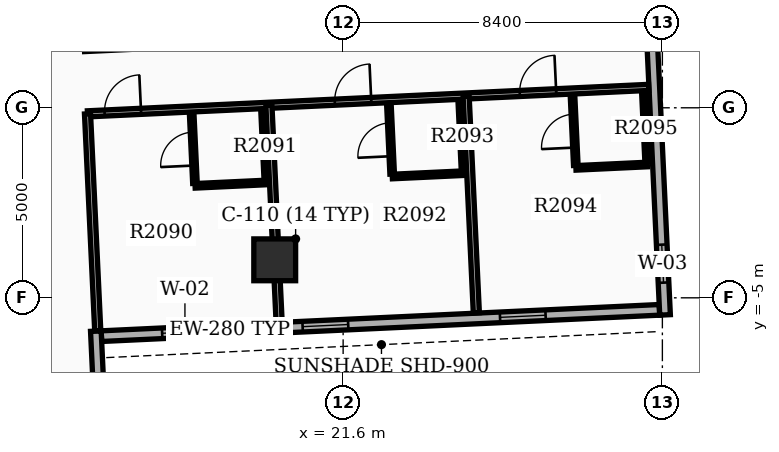
"""IFC4 building model, lengths in metres.
Left out: names, types, materials, properties, quantities, classifications, styles, units other than length and angle.
Written with IfcOpenShell. Run it as: python <this file> out.ifc"""

import sys

from ifc_helpers import new_model, si_unit, direction, frame, frame_2d, origin, origin_2d, place, context, subcontext, project, spatial, rectangle, extrude, element, fill, save


model = new_model("IFC4")
c1 = context("Model", 3, precision=1e-05, world=origin(), true_north=direction((0.0, 1.0)))
c2 = subcontext(c1, "Body", "Model", "MODEL_VIEW")
j1 = project(units=[si_unit("LENGTHUNIT", "METRE"), si_unit("PLANEANGLEUNIT", "RADIAN")], contexts=[c1])
p1 = place(None, origin())
s1 = spatial("IfcSite", under=j1, at=p1, CompositionType="ELEMENT")
p2 = place(p1, origin())
s2 = spatial("IfcBuilding", under=s1, at=p2, CompositionType="ELEMENT")
p3 = place(p2, frame((0.0, 0.0, 132.0)))
s3 = spatial("IfcBuildingStorey", under=s2, at=p3, CompositionType="ELEMENT", Elevation=132.0)
p4 = place(p3, frame((19.8, -4.0, 0.0), z_axis=(0.0, 0.0, 1.0), x_axis=(1.0, 0.0, 0.0)))
e1 = element("IfcColumn", 1, at=p4, inside=s3, PredefinedType="COLUMN", context=c2, shape_type="SweptSolid", body=[
    extrude(rectangle(XDim=1.1, YDim=1.1, at=origin_2d()), origin(), (0.0, 0.0, 1.0), 3.9),
])
p5 = place(p3, frame((15.24, -6.009, 0.0), z_axis=(0.0, 0.0, 1.0), x_axis=(0.998890124275, 0.047101163748, 0.0)))
e2 = element("IfcWall", 2, at=p5, inside=s3, PredefinedType="STANDARD", context=c2, shape_type="SweptSolid", body=[
    extrude(rectangle(XDim=14.7, YDim=0.28, at=frame_2d((7.35, 0.0))), origin(), (0.0, 0.0, 1.0), 2.97),
])
p6 = place(p5, frame((1.6, 0.0, 0.8)))
e3 = element("IfcOpeningElement", 3, at=p6, cuts=e2, PredefinedType="OPENING", context=c2, shape_type="SweptSolid", body=[
    extrude(rectangle(XDim=1.2, YDim=1.6, at=frame_2d((0.6, 0.8))), frame((0.0, 0.15, 0.0), z_axis=(0.0, -1.0, 0.0), x_axis=(1.0, 0.0, 0.0)), (0.0, 0.0, 1.0), 0.3),
])
p7 = place(p5, frame((5.3, 0.0, 0.8)))
e4 = element("IfcOpeningElement", 4, at=p7, cuts=e2, PredefinedType="OPENING", context=c2, shape_type="SweptSolid", body=[
    extrude(rectangle(XDim=1.2, YDim=1.6, at=frame_2d((0.6, 0.8))), frame((0.0, 0.15, 0.0), z_axis=(0.0, -1.0, 0.0), x_axis=(1.0, 0.0, 0.0)), (0.0, 0.0, 1.0), 0.3),
])
p8 = place(p5, frame((10.5, 0.0, 0.8)))
e5 = element("IfcOpeningElement", 5, at=p8, cuts=e2, PredefinedType="OPENING", context=c2, shape_type="SweptSolid", body=[
    extrude(rectangle(XDim=1.2, YDim=1.6, at=frame_2d((0.6, 0.8))), frame((0.0, 0.15, 0.0), z_axis=(0.0, -1.0, 0.0), x_axis=(1.0, 0.0, 0.0)), (0.0, 0.0, 1.0), 0.3),
])
p9 = place(p3, frame((30.07, -5.45, 0.0), z_axis=(0.0, 0.0, 1.0), x_axis=(-0.047101845086, 0.998890092147, 0.0)))
e6 = element("IfcWall", 6, at=p9, inside=s3, PredefinedType="STANDARD", context=c2, shape_type="SweptSolid", body=[
    extrude(rectangle(XDim=13.72, YDim=0.28, at=frame_2d((6.86, 0.0))), origin(), (0.0, 0.0, 1.0), 2.97),
])
p10 = place(p9, frame((0.85, 0.0, 0.85)))
e7 = element("IfcOpeningElement", 7, at=p10, cuts=e6, PredefinedType="OPENING", context=c2, shape_type="SweptSolid", body=[
    extrude(rectangle(XDim=1.0, YDim=1.5, at=frame_2d((0.5, 0.75))), frame((0.0, 0.15, 0.0), z_axis=(0.0, -1.0, 0.0), x_axis=(1.0, 0.0, 0.0)), (0.0, 0.0, 1.0), 0.3),
])
p11 = place(p3, frame((15.094, -5.875, 0.0), z_axis=(0.0, 0.0, 1.0), x_axis=(0.04712043756, -0.998889215261, 0.0)))
e8 = element("IfcWall", 8, at=p11, inside=s3, PredefinedType="STANDARD", context=c2, shape_type="SweptSolid", body=[
    extrude(rectangle(XDim=6.86, YDim=0.28, at=frame_2d((3.43, 0.0))), origin(), (0.0, 0.0, 1.0), 2.97),
])
p12 = place(p3, frame((14.874, -0.159, 0.0), z_axis=(0.0, 0.0, 1.0), x_axis=(0.99889000272, 0.04710374153, 0.0)))
e9 = element("IfcWall", 9, at=p12, inside=s3, PredefinedType="PARTITIONING", context=c2, shape_type="SweptSolid", body=[
    extrude(rectangle(XDim=14.782, YDim=0.16, at=frame_2d((7.391, 0.0))), origin(), (0.0, 0.0, 1.0), 2.96),
])
p13 = place(p12, frame((0.45, 0.0, 0.0)))
e10 = element("IfcOpeningElement", 10, at=p13, cuts=e9, PredefinedType="OPENING", context=c2, shape_type="SweptSolid", body=[
    extrude(rectangle(XDim=0.96, YDim=2.15, at=frame_2d((0.48, 1.075))), frame((0.0, 0.09, 0.0), z_axis=(0.0, -1.0, 0.0), x_axis=(1.0, 0.0, 0.0)), (0.0, 0.0, 1.0), 0.18),
])
p14 = place(p12, frame((6.514, 0.0, 0.0)))
e11 = element("IfcOpeningElement", 11, at=p14, cuts=e9, PredefinedType="OPENING", context=c2, shape_type="SweptSolid", body=[
    extrude(rectangle(XDim=0.96, YDim=2.15, at=frame_2d((0.48, 1.075))), frame((0.0, 0.09, 0.0), z_axis=(0.0, -1.0, 0.0), x_axis=(1.0, 0.0, 0.0)), (0.0, 0.0, 1.0), 0.18),
])
p15 = place(p12, frame((11.386, 0.0, 0.0)))
e12 = element("IfcOpeningElement", 12, at=p15, cuts=e9, PredefinedType="OPENING", context=c2, shape_type="SweptSolid", body=[
    extrude(rectangle(XDim=0.96, YDim=2.15, at=frame_2d((0.48, 1.075))), frame((0.0, 0.09, 0.0), z_axis=(0.0, -1.0, 0.0), x_axis=(1.0, 0.0, 0.0)), (0.0, 0.0, 1.0), 0.18),
])
for number, where, z_axis, x_axis in (
    (13, (14.874, -0.159, 0.0), (0.0, 0.0, 1.0), (0.047, -0.999, 0.0)),
    (14, (19.647, 0.066, 0.0), (0.0, 0.0, 1.0), (0.047, -0.999, 0.0)),
):
    element("IfcWall", number, at=place(p3, frame(where, z_axis=z_axis, x_axis=x_axis)), inside=s3, PredefinedType="PARTITIONING", context=c2, shape_type="SweptSolid", body=[
        extrude(rectangle(XDim=5.712, YDim=0.16, at=frame_2d((2.856, 0.0))), origin(), (0.0, 0.0, 1.0), 2.96),
    ])
p16 = place(p3, frame((17.701, -1.988, 0.0), z_axis=(0.0, 0.0, 1.0), x_axis=(-0.047220968666, 0.998884467853, 0.0)))
e15 = element("IfcWall", 15, at=p16, inside=s3, PredefinedType="PARTITIONING", context=c2, shape_type="SweptSolid", body=[
    extrude(rectangle(XDim=1.82, YDim=0.12, at=frame_2d((0.91, 0.0))), origin(), (0.0, 0.0, 1.0), 2.96),
])
p17 = place(p16, frame((0.47, 0.0, 0.0)))
e16 = element("IfcOpeningElement", 16, at=p17, cuts=e15, PredefinedType="OPENING", context=c2, shape_type="SweptSolid", body=[
    extrude(rectangle(XDim=0.88, YDim=2.1, at=frame_2d((0.44, 1.05))), frame((0.0, 0.07, 0.0), z_axis=(0.0, -1.0, 0.0), x_axis=(1.0, 0.0, 0.0)), (0.0, 0.0, 1.0), 0.14),
])
p18 = place(p3, frame((19.579, -1.9, 0.0), z_axis=(0.0, 0.0, 1.0), x_axis=(-0.047080807099, 0.998891083954, 0.0)))
e17 = element("IfcWall", 17, at=p18, inside=s3, PredefinedType="PARTITIONING", context=c2, shape_type="SweptSolid", body=[
    extrude(rectangle(XDim=1.82, YDim=0.12, at=frame_2d((0.91, 0.0))), origin(), (0.0, 0.0, 1.0), 2.96),
])
p19 = place(p3, frame((17.704, -2.053, 0.0), z_axis=(0.0, 0.0, 1.0), x_axis=(0.998888319371, 0.047139425368, 0.0)))
e18 = element("IfcWall", 18, at=p19, inside=s3, PredefinedType="PARTITIONING", context=c2, shape_type="SweptSolid", body=[
    extrude(rectangle(XDim=1.88, YDim=0.12, at=frame_2d((0.94, 0.0))), origin(), (0.0, 0.0, 1.0), 2.96),
])
p20 = place(p3, frame((24.836, 0.31, 0.0), z_axis=(0.0, 0.0, 1.0), x_axis=(0.047100122846, -0.998890173356, 0.0)))
e19 = element("IfcWall", 19, at=p20, inside=s3, PredefinedType="PARTITIONING", context=c2, shape_type="SweptSolid", body=[
    extrude(rectangle(XDim=5.712, YDim=0.16, at=frame_2d((2.856, 0.0))), origin(), (0.0, 0.0, 1.0), 2.96),
])
p21 = place(p3, frame((22.89, -1.744, 0.0), z_axis=(0.0, 0.0, 1.0), x_axis=(-0.047087116047, 0.998890786574, 0.0)))
e20 = element("IfcWall", 20, at=p21, inside=s3, PredefinedType="PARTITIONING", context=c2, shape_type="SweptSolid", body=[
    extrude(rectangle(XDim=1.82, YDim=0.12, at=frame_2d((0.91, 0.0))), origin(), (0.0, 0.0, 1.0), 2.96),
])
p22 = place(p21, frame((0.47, 0.0, 0.0)))
e21 = element("IfcOpeningElement", 21, at=p22, cuts=e20, PredefinedType="OPENING", context=c2, shape_type="SweptSolid", body=[
    extrude(rectangle(XDim=0.88, YDim=2.1, at=frame_2d((0.44, 1.05))), frame((0.0, 0.07, 0.0), z_axis=(0.0, -1.0, 0.0), x_axis=(1.0, 0.0, 0.0)), (0.0, 0.0, 1.0), 0.14),
])
p23 = place(p3, frame((24.769, -1.655, 0.0), z_axis=(0.0, 0.0, 1.0), x_axis=(-0.047220968666, 0.998884467853, 0.0)))
e22 = element("IfcWall", 22, at=p23, inside=s3, PredefinedType="PARTITIONING", context=c2, shape_type="SweptSolid", body=[
    extrude(rectangle(XDim=1.82, YDim=0.12, at=frame_2d((0.91, 0.0))), origin(), (0.0, 0.0, 1.0), 2.96),
])
p24 = place(p3, frame((22.894, -1.809, 0.0), z_axis=(0.0, 0.0, 1.0), x_axis=(0.998888319371, 0.047139425368, 0.0)))
e23 = element("IfcWall", 23, at=p24, inside=s3, PredefinedType="PARTITIONING", context=c2, shape_type="SweptSolid", body=[
    extrude(rectangle(XDim=1.88, YDim=0.12, at=frame_2d((0.94, 0.0))), origin(), (0.0, 0.0, 1.0), 2.96),
])
p25 = place(p3, frame((27.722, -1.516, 0.0), z_axis=(0.0, 0.0, 1.0), x_axis=(-0.047080807099, 0.998891083954, 0.0)))
e24 = element("IfcWall", 24, at=p25, inside=s3, PredefinedType="PARTITIONING", context=c2, shape_type="SweptSolid", body=[
    extrude(rectangle(XDim=1.82, YDim=0.12, at=frame_2d((0.91, 0.0))), origin(), (0.0, 0.0, 1.0), 2.96),
])
p26 = place(p25, frame((0.47, 0.0, 0.0)))
e25 = element("IfcOpeningElement", 25, at=p26, cuts=e24, PredefinedType="OPENING", context=c2, shape_type="SweptSolid", body=[
    extrude(rectangle(XDim=0.88, YDim=2.1, at=frame_2d((0.44, 1.05))), frame((0.0, 0.07, 0.0), z_axis=(0.0, -1.0, 0.0), x_axis=(1.0, 0.0, 0.0)), (0.0, 0.0, 1.0), 0.14),
])
p27 = place(p3, frame((29.6, -1.427, 0.0), z_axis=(0.0, 0.0, 1.0), x_axis=(-0.047080807099, 0.998891083954, 0.0)))
e26 = element("IfcWall", 26, at=p27, inside=s3, PredefinedType="PARTITIONING", context=c2, shape_type="SweptSolid", body=[
    extrude(rectangle(XDim=1.82, YDim=0.12, at=frame_2d((0.91, 0.0))), origin(), (0.0, 0.0, 1.0), 2.96),
])
p28 = place(p3, frame((27.725, -1.581, 0.0), z_axis=(0.0, 0.0, 1.0), x_axis=(0.998888607882, 0.047133311408, 0.0)))
e27 = element("IfcWall", 27, at=p28, inside=s3, PredefinedType="PARTITIONING", context=c2, shape_type="SweptSolid", body=[
    extrude(rectangle(XDim=1.88, YDim=0.12, at=frame_2d((0.94, 0.0))), origin(), (0.0, 0.0, 1.0), 2.96),
])
p29 = place(p6, origin())
e28 = element("IfcWindow", 28, at=p29, inside=s3, PartitioningType="SINGLE_PANEL", PredefinedType="WINDOW", context=c2, shape_type="SweptSolid", body=[
    extrude(rectangle(XDim=1.2, YDim=1.6, at=frame_2d((0.6, 0.8))), frame((0.0, 0.03, 0.0), z_axis=(0.0, -1.0, 0.0), x_axis=(1.0, 0.0, 0.0)), (0.0, 0.0, 1.0), 0.06),
])
fill(e3, e28)
p30 = place(p7, origin())
e29 = element("IfcWindow", 29, at=p30, inside=s3, PartitioningType="SINGLE_PANEL", PredefinedType="WINDOW", context=c2, shape_type="SweptSolid", body=[
    extrude(rectangle(XDim=1.2, YDim=1.6, at=frame_2d((0.6, 0.8))), frame((0.0, 0.03, 0.0), z_axis=(0.0, -1.0, 0.0), x_axis=(1.0, 0.0, 0.0)), (0.0, 0.0, 1.0), 0.06),
])
fill(e4, e29)
p31 = place(p8, origin())
e30 = element("IfcWindow", 30, at=p31, inside=s3, PartitioningType="SINGLE_PANEL", PredefinedType="WINDOW", context=c2, shape_type="SweptSolid", body=[
    extrude(rectangle(XDim=1.2, YDim=1.6, at=frame_2d((0.6, 0.8))), frame((0.0, 0.03, 0.0), z_axis=(0.0, -1.0, 0.0), x_axis=(1.0, 0.0, 0.0)), (0.0, 0.0, 1.0), 0.06),
])
fill(e5, e30)
p32 = place(p10, origin())
e31 = element("IfcWindow", 31, at=p32, inside=s3, PartitioningType="SINGLE_PANEL", PredefinedType="WINDOW", context=c2, shape_type="SweptSolid", body=[
    extrude(rectangle(XDim=1.0, YDim=1.5, at=frame_2d((0.5, 0.75))), frame((0.0, 0.03, 0.0), z_axis=(0.0, -1.0, 0.0), x_axis=(1.0, 0.0, 0.0)), (0.0, 0.0, 1.0), 0.06),
])
fill(e7, e31)
p33 = place(p13, origin())
e32 = element("IfcDoor", 32, at=p33, inside=s3, OperationType="SINGLE_SWING_RIGHT", PredefinedType="DOOR", context=c2, shape_type="SweptSolid", body=[
    extrude(rectangle(XDim=0.96, YDim=2.15, at=frame_2d((0.48, 1.075))), frame((0.0, 0.025, 0.0), z_axis=(0.0, -1.0, 0.0), x_axis=(1.0, 0.0, 0.0)), (0.0, 0.0, 1.0), 0.05),
])
fill(e10, e32)
p34 = place(p17, origin())
e33 = element("IfcDoor", 33, at=p34, inside=s3, OperationType="SINGLE_SWING_LEFT", PredefinedType="DOOR", context=c2, shape_type="SweptSolid", body=[
    extrude(rectangle(XDim=0.88, YDim=2.1, at=frame_2d((0.44, 1.05))), frame((0.0, 0.025, 0.0), z_axis=(0.0, -1.0, 0.0), x_axis=(1.0, 0.0, 0.0)), (0.0, 0.0, 1.0), 0.05),
])
fill(e16, e33)
p35 = place(p14, origin())
e34 = element("IfcDoor", 34, at=p35, inside=s3, OperationType="SINGLE_SWING_RIGHT", PredefinedType="DOOR", context=c2, shape_type="SweptSolid", body=[
    extrude(rectangle(XDim=0.96, YDim=2.15, at=frame_2d((0.48, 1.075))), frame((0.0, 0.025, 0.0), z_axis=(0.0, -1.0, 0.0), x_axis=(1.0, 0.0, 0.0)), (0.0, 0.0, 1.0), 0.05),
])
fill(e11, e34)
p36 = place(p22, origin())
e35 = element("IfcDoor", 35, at=p36, inside=s3, OperationType="SINGLE_SWING_LEFT", PredefinedType="DOOR", context=c2, shape_type="SweptSolid", body=[
    extrude(rectangle(XDim=0.88, YDim=2.1, at=frame_2d((0.44, 1.05))), frame((0.0, 0.025, 0.0), z_axis=(0.0, -1.0, 0.0), x_axis=(1.0, 0.0, 0.0)), (0.0, 0.0, 1.0), 0.05),
])
fill(e21, e35)
p37 = place(p15, origin())
e36 = element("IfcDoor", 36, at=p37, inside=s3, OperationType="SINGLE_SWING_RIGHT", PredefinedType="DOOR", context=c2, shape_type="SweptSolid", body=[
    extrude(rectangle(XDim=0.96, YDim=2.15, at=frame_2d((0.48, 1.075))), frame((0.0, 0.025, 0.0), z_axis=(0.0, -1.0, 0.0), x_axis=(1.0, 0.0, 0.0)), (0.0, 0.0, 1.0), 0.05),
])
fill(e12, e36)
p38 = place(p26, origin())
e37 = element("IfcDoor", 37, at=p38, inside=s3, OperationType="SINGLE_SWING_LEFT", PredefinedType="DOOR", context=c2, shape_type="SweptSolid", body=[
    extrude(rectangle(XDim=0.88, YDim=2.1, at=frame_2d((0.44, 1.05))), frame((0.0, 0.025, 0.0), z_axis=(0.0, -1.0, 0.0), x_axis=(1.0, 0.0, 0.0)), (0.0, 0.0, 1.0), 0.05),
])
fill(e25, e37)
save(model, sys.argv[1])
